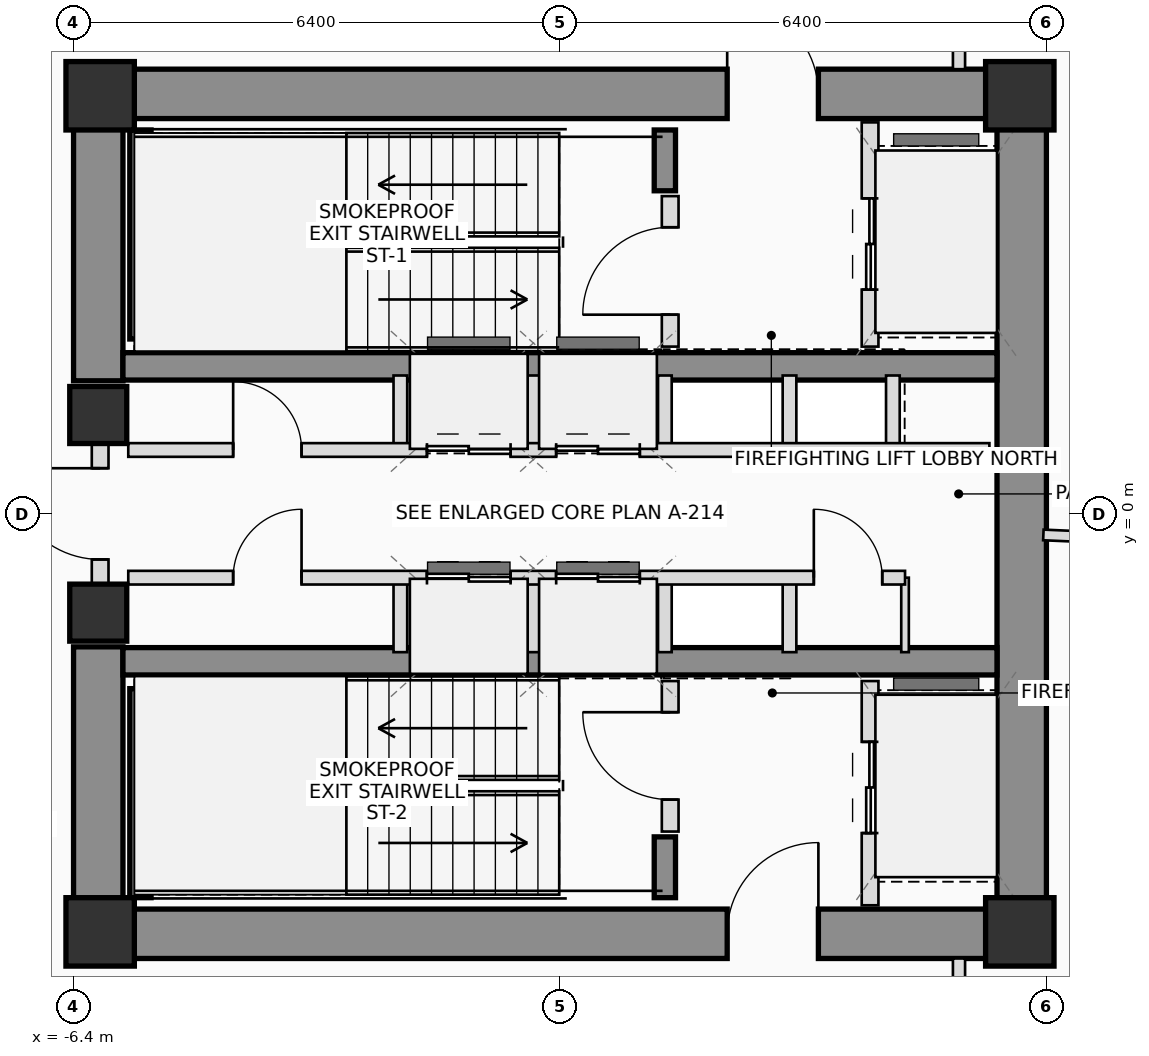
"""IFC4 building model, lengths in metres.
Left out: names, types, materials, properties, quantities, classifications, styles, units other than length and angle.
Written with IfcOpenShell. Run it as: python <this file> out.ifc"""

import sys

from ifc_helpers import new_model, si_unit, direction, frame, frame_2d, origin, origin_2d, place, context, subcontext, project, spatial, rectangle, extrude, source, transform, mapped, element, fill, save


model = new_model("IFC4")
c1 = context("Model", 3, precision=1e-05, world=origin(), true_north=direction((0.0, 1.0)))
c2 = subcontext(c1, "Body", "Model", "MODEL_VIEW")
j1 = project(units=[si_unit("LENGTHUNIT", "METRE"), si_unit("PLANEANGLEUNIT", "RADIAN")], contexts=[c1])
p1 = place(None, origin())
s1 = spatial("IfcSite", under=j1, at=p1, CompositionType="ELEMENT")
p2 = place(p1, origin())
s2 = spatial("IfcBuilding", under=s1, at=p2, CompositionType="ELEMENT")
p3 = place(p2, frame((0.0, 0.0, 150.2)))
s3 = spatial("IfcBuildingStorey", under=s2, at=p3, CompositionType="ELEMENT", Elevation=150.2)
m1 = source(origin(), c2, "Body", "SweptSolid", [
    extrude(rectangle(XDim=0.9, YDim=0.9, at=origin_2d()), origin(), (0.0, 0.0, 1.0), 3.45),
])
for number, where, z_axis, x_axis in (
    (1, (-6.05, -5.5, 0.0), (0.0, 0.0, 1.0), (1.0, 0.0, 0.0)),
    (2, (6.05, -5.5, 0.0), (0.0, 0.0, 1.0), (1.0, 0.0, 0.0)),
    (3, (6.05, 5.5, 0.0), (0.0, 0.0, 1.0), (1.0, 0.0, 0.0)),
    (4, (-6.05, 5.5, 0.0), (0.0, 0.0, 1.0), (1.0, 0.0, 0.0)),
):
    element("IfcColumn", number, at=place(p3, frame(where, z_axis=z_axis, x_axis=x_axis)), inside=s3, PredefinedType="COLUMN", context=c2, shape_type="MappedRepresentation", body=[
        mapped(m1, transform((0.0, 0.0, 0.0), scale=1.0)),
    ])
p4 = place(p3, frame((-6.4, 5.525, 0.0), z_axis=(0.0, 0.0, 1.0), x_axis=(1.0, 0.0, 0.0)))
e5 = element("IfcWall", 5, at=p4, inside=s3, PredefinedType="SHEAR", context=c2, shape_type="SweptSolid", body=[
    extrude(rectangle(XDim=12.8, YDim=0.65, at=frame_2d((6.4, 0.0))), origin(), (0.0, 0.0, 1.0), 3.45),
])
p5 = place(p4, frame((8.6, 0.0, 0.0)))
e6 = element("IfcOpeningElement", 6, at=p5, cuts=e5, PredefinedType="OPENING", context=c2, shape_type="SweptSolid", body=[
    extrude(rectangle(XDim=1.2, YDim=2.2, at=frame_2d((0.6, 1.1))), frame((0.0, 0.335, 0.0), z_axis=(0.0, -1.0, 0.0), x_axis=(1.0, 0.0, 0.0)), (0.0, 0.0, 1.0), 0.67),
])
p6 = place(p3, frame((-6.4, -5.525, 0.0), z_axis=(0.0, 0.0, 1.0), x_axis=(1.0, 0.0, 0.0)))
e7 = element("IfcWall", 7, at=p6, inside=s3, PredefinedType="SHEAR", context=c2, shape_type="SweptSolid", body=[
    extrude(rectangle(XDim=12.8, YDim=0.65, at=frame_2d((6.4, 0.0))), origin(), (0.0, 0.0, 1.0), 3.45),
])
p7 = place(p6, frame((8.6, 0.0, 0.0)))
e8 = element("IfcOpeningElement", 8, at=p7, cuts=e7, PredefinedType="OPENING", context=c2, shape_type="SweptSolid", body=[
    extrude(rectangle(XDim=1.2, YDim=2.2, at=frame_2d((0.6, 1.1))), frame((0.0, 0.335, 0.0), z_axis=(0.0, -1.0, 0.0), x_axis=(1.0, 0.0, 0.0)), (0.0, 0.0, 1.0), 0.67),
])
p8 = place(p3, frame((6.075, -5.2, 0.0), z_axis=(0.0, 0.0, 1.0), x_axis=(0.0, 1.0, 0.0)))
e9 = element("IfcWall", 9, at=p8, inside=s3, PredefinedType="SHEAR", context=c2, shape_type="SweptSolid", body=[
    extrude(rectangle(XDim=10.4, YDim=0.65, at=frame_2d((5.2, 0.0))), origin(), (0.0, 0.0, 1.0), 3.45),
])
for number, where, z_axis, x_axis in (
    (10, (-6.075, -5.2, 0.0), (0.0, 0.0, 1.0), (0.0, 1.0, 0.0)),
    (11, (-6.075, 1.75, 0.0), (0.0, 0.0, 1.0), (0.0, 1.0, 0.0)),
):
    element("IfcWall", number, at=place(p3, frame(where, z_axis=z_axis, x_axis=x_axis)), inside=s3, PredefinedType="SHEAR", context=c2, shape_type="SweptSolid", body=[
        extrude(rectangle(XDim=3.45, YDim=0.65, at=frame_2d((1.725, 0.0))), origin(), (0.0, 0.0, 1.0), 3.45),
    ])
for number, where, z_axis, x_axis in (
    (12, (-5.75, 1.94, 0.0), (0.0, 0.0, 1.0), (1.0, 0.0, 0.0)),
    (13, (-5.75, -1.94, 0.0), (0.0, 0.0, 1.0), (1.0, 0.0, 0.0)),
):
    element("IfcWall", number, at=place(p3, frame(where, z_axis=z_axis, x_axis=x_axis)), inside=s3, PredefinedType="SHEAR", context=c2, shape_type="SweptSolid", body=[
        extrude(rectangle(XDim=11.5, YDim=0.36, at=frame_2d((5.75, 0.0))), origin(), (0.0, 0.0, 1.0), 3.45),
    ])
p9 = place(p3, frame((-5.52, 2.3, 0.0), z_axis=(0.0, 0.0, 1.0), x_axis=(0.0, 1.0, 0.0)))
e14 = element("IfcWall", 14, at=p9, inside=s3, PredefinedType="SHEAR", context=c2, shape_type="SweptSolid", body=[
    extrude(rectangle(XDim=2.75, YDim=0.28, at=frame_2d((1.375, 0.0))), origin(), (0.0, 0.0, 1.0), 3.45),
])
p10 = place(p3, frame((1.38, 4.25, 0.0), z_axis=(0.0, 0.0, 1.0), x_axis=(0.0, 1.0, 0.0)))
e15 = element("IfcWall", 15, at=p10, inside=s3, PredefinedType="SHEAR", context=c2, shape_type="SweptSolid", body=[
    extrude(rectangle(XDim=0.8, YDim=0.28, at=frame_2d((0.4, 0.0))), origin(), (0.0, 0.0, 1.0), 3.45),
])
p11 = place(p3, frame((-5.52, -5.05, 0.0), z_axis=(0.0, 0.0, 1.0), x_axis=(0.0, 1.0, 0.0)))
e16 = element("IfcWall", 16, at=p11, inside=s3, PredefinedType="SHEAR", context=c2, shape_type="SweptSolid", body=[
    extrude(rectangle(XDim=2.75, YDim=0.28, at=frame_2d((1.375, 0.0))), origin(), (0.0, 0.0, 1.0), 3.45),
])
p12 = place(p3, frame((1.38, -5.05, 0.0), z_axis=(0.0, 0.0, 1.0), x_axis=(0.0, 1.0, 0.0)))
e17 = element("IfcWall", 17, at=p12, inside=s3, PredefinedType="SHEAR", context=c2, shape_type="SweptSolid", body=[
    extrude(rectangle(XDim=0.8, YDim=0.28, at=frame_2d((0.4, 0.0))), origin(), (0.0, 0.0, 1.0), 3.45),
])
m2 = source(origin(), c2, "Body", "SweptSolid", [
    extrude(rectangle(XDim=0.75, YDim=0.75, at=origin_2d()), origin(), (0.0, 0.0, 1.0), 3.45),
])
for number, where, z_axis, x_axis in (
    (18, (-6.075, -1.3, 0.0), (0.0, 0.0, 1.0), (1.0, 0.0, 0.0)),
    (19, (-6.075, 1.3, 0.0), (0.0, 0.0, 1.0), (1.0, 0.0, 0.0)),
):
    element("IfcColumn", number, at=place(p3, frame(where, z_axis=z_axis, x_axis=x_axis)), inside=s3, PredefinedType="COLUMN", context=c2, shape_type="MappedRepresentation", body=[
        mapped(m2, transform((0.0, 0.0, 0.0), scale=1.0)),
    ])
p13 = place(p3, frame((-6.05, -0.95, 0.0), z_axis=(0.0, 0.0, 1.0), x_axis=(0.0, 1.0, 0.0)))
e20 = element("IfcWall", 20, at=p13, inside=s3, PredefinedType="PLUMBINGWALL", context=c2, shape_type="SweptSolid", body=[
    extrude(rectangle(XDim=1.9, YDim=0.22, at=frame_2d((0.95, 0.0))), origin(), (0.0, 0.0, 1.0), 2.19),
])
p14 = place(p13, frame((0.35, 0.0, 0.0)))
e21 = element("IfcOpeningElement", 21, at=p14, cuts=e20, PredefinedType="OPENING", context=c2, shape_type="SweptSolid", body=[
    extrude(rectangle(XDim=1.2, YDim=2.2, at=frame_2d((0.6, 1.1))), frame((0.0, 0.12, 0.0), z_axis=(0.0, -1.0, 0.0), x_axis=(1.0, 0.0, 0.0)), (0.0, 0.0, 1.0), 0.24),
])
p15 = place(p3, frame((1.45, 2.2, 0.0), z_axis=(0.0, 0.0, 1.0), x_axis=(0.0, 1.0, 0.0)))
e22 = element("IfcWall", 22, at=p15, inside=s3, PredefinedType="PLUMBINGWALL", context=c2, shape_type="SweptSolid", body=[
    extrude(rectangle(XDim=1.98, YDim=0.22, at=frame_2d((0.99, 0.0))), origin(), (0.0, 0.0, 1.0), 3.21),
])
p16 = place(p15, frame((0.42, 0.0, 0.0)))
e23 = element("IfcOpeningElement", 23, at=p16, cuts=e22, PredefinedType="OPENING", context=c2, shape_type="SweptSolid", body=[
    extrude(rectangle(XDim=1.15, YDim=2.15, at=frame_2d((0.575, 1.075))), frame((0.0, 0.12, 0.0), z_axis=(0.0, -1.0, 0.0), x_axis=(1.0, 0.0, 0.0)), (0.0, 0.0, 1.0), 0.24),
])
p17 = place(p3, frame((4.08, 2.2, 0.0), z_axis=(0.0, 0.0, 1.0), x_axis=(0.0, 1.0, 0.0)))
e24 = element("IfcWall", 24, at=p17, inside=s3, PredefinedType="PLUMBINGWALL", context=c2, shape_type="SweptSolid", body=[
    extrude(rectangle(XDim=2.95, YDim=0.22, at=frame_2d((1.475, 0.0))), origin(), (0.0, 0.0, 1.0), 3.21),
])
p18 = place(p17, frame((0.75, 0.0, 0.0)))
e25 = element("IfcOpeningElement", 25, at=p18, cuts=e24, PredefinedType="OPENING", context=c2, shape_type="SweptSolid", body=[
    extrude(rectangle(XDim=1.2, YDim=2.25, at=frame_2d((0.6, 1.125))), frame((0.0, 0.12, 0.0), z_axis=(0.0, -1.0, 0.0), x_axis=(1.0, 0.0, 0.0)), (0.0, 0.0, 1.0), 0.24),
])
p19 = place(p3, frame((1.45, -4.18, 0.0), z_axis=(0.0, 0.0, 1.0), x_axis=(0.0, 1.0, 0.0)))
e26 = element("IfcWall", 26, at=p19, inside=s3, PredefinedType="PLUMBINGWALL", context=c2, shape_type="SweptSolid", body=[
    extrude(rectangle(XDim=1.98, YDim=0.22, at=frame_2d((0.99, 0.0))), origin(), (0.0, 0.0, 1.0), 3.21),
])
p20 = place(p19, frame((0.42, 0.0, 0.0)))
e27 = element("IfcOpeningElement", 27, at=p20, cuts=e26, PredefinedType="OPENING", context=c2, shape_type="SweptSolid", body=[
    extrude(rectangle(XDim=1.15, YDim=2.15, at=frame_2d((0.575, 1.075))), frame((0.0, 0.12, 0.0), z_axis=(0.0, -1.0, 0.0), x_axis=(1.0, 0.0, 0.0)), (0.0, 0.0, 1.0), 0.24),
])
p21 = place(p3, frame((4.08, -5.15, 0.0), z_axis=(0.0, 0.0, 1.0), x_axis=(0.0, 1.0, 0.0)))
e28 = element("IfcWall", 28, at=p21, inside=s3, PredefinedType="PLUMBINGWALL", context=c2, shape_type="SweptSolid", body=[
    extrude(rectangle(XDim=2.95, YDim=0.22, at=frame_2d((1.475, 0.0))), origin(), (0.0, 0.0, 1.0), 3.21),
])
p22 = place(p21, frame((0.95, 0.0, 0.0)))
e29 = element("IfcOpeningElement", 29, at=p22, cuts=e28, PredefinedType="OPENING", context=c2, shape_type="SweptSolid", body=[
    extrude(rectangle(XDim=1.2, YDim=2.25, at=frame_2d((0.6, 1.125))), frame((0.0, 0.12, 0.0), z_axis=(0.0, -1.0, 0.0), x_axis=(1.0, 0.0, 0.0)), (0.0, 0.0, 1.0), 0.24),
])
for number, where, z_axis, x_axis in (
    (30, (-2.1, 0.84, 0.0), (0.0, 0.0, 1.0), (0.0, 1.0, 0.0)),
    (31, (-2.1, -1.82, 0.0), (0.0, 0.0, 1.0), (0.0, 1.0, 0.0)),
    (32, (-0.35, 0.84, 0.0), (0.0, 0.0, 1.0), (0.0, 1.0, 0.0)),
    (33, (-0.35, -1.82, 0.0), (0.0, 0.0, 1.0), (0.0, 1.0, 0.0)),
    (34, (1.38, 0.84, 0.0), (0.0, 0.0, 1.0), (0.0, 1.0, 0.0)),
    (35, (1.38, -1.82, 0.0), (0.0, 0.0, 1.0), (0.0, 1.0, 0.0)),
    (36, (3.02, 0.84, 0.0), (0.0, 0.0, 1.0), (0.0, 1.0, 0.0)),
    (37, (4.38, 0.84, 0.0), (0.0, 0.0, 1.0), (0.0, 1.0, 0.0)),
    (38, (3.02, -1.82, 0.0), (0.0, 0.0, 1.0), (0.0, 1.0, 0.0)),
):
    element("IfcWall", number, at=place(p3, frame(where, z_axis=z_axis, x_axis=x_axis)), inside=s3, PredefinedType="PLUMBINGWALL", context=c2, shape_type="SweptSolid", body=[
        extrude(rectangle(XDim=0.98, YDim=0.18, at=frame_2d((0.49, 0.0))), origin(), (0.0, 0.0, 1.0), 3.21),
    ])
p23 = place(p3, frame((4.54, -1.82, 0.0), z_axis=(0.0, 0.0, 1.0), x_axis=(0.0, 1.0, 0.0)))
e39 = element("IfcWall", 39, at=p23, inside=s3, PredefinedType="PARTITIONING", context=c2, shape_type="SweptSolid", body=[
    extrude(rectangle(XDim=0.98, YDim=0.1, at=frame_2d((0.49, 0.0))), origin(), (0.0, 0.0, 1.0), 3.21),
])
p24 = place(p3, frame((-5.68, 0.84, 0.0), z_axis=(0.0, 0.0, 1.0), x_axis=(1.0, 0.0, 0.0)))
e40 = element("IfcWall", 40, at=p24, inside=s3, PredefinedType="PLUMBINGWALL", context=c2, shape_type="SweptSolid", body=[
    extrude(rectangle(XDim=11.33, YDim=0.18, at=frame_2d((5.665, 0.0))), origin(), (0.0, 0.0, 1.0), 3.21),
])
p25 = place(p24, frame((1.38, 0.0, 0.0)))
e41 = element("IfcOpeningElement", 41, at=p25, cuts=e40, PredefinedType="OPENING", context=c2, shape_type="SweptSolid", body=[
    extrude(rectangle(XDim=0.9, YDim=2.05, at=frame_2d((0.45, 1.025))), frame((0.0, 0.1, 0.0), z_axis=(0.0, -1.0, 0.0), x_axis=(1.0, 0.0, 0.0)), (0.0, 0.0, 1.0), 0.2),
])
p26 = place(p24, frame((3.93, 0.0, 0.0)))
e42 = element("IfcOpeningElement", 42, at=p26, cuts=e40, PredefinedType="OPENING", context=c2, shape_type="SweptSolid", body=[
    extrude(rectangle(XDim=1.1, YDim=2.2, at=frame_2d((0.55, 1.1))), frame((0.0, 0.1, 0.0), z_axis=(0.0, -1.0, 0.0), x_axis=(1.0, 0.0, 0.0)), (0.0, 0.0, 1.0), 0.2),
])
p27 = place(p24, frame((5.63, 0.0, 0.0)))
e43 = element("IfcOpeningElement", 43, at=p27, cuts=e40, PredefinedType="OPENING", context=c2, shape_type="SweptSolid", body=[
    extrude(rectangle(XDim=1.1, YDim=2.2, at=frame_2d((0.55, 1.1))), frame((0.0, 0.1, 0.0), z_axis=(0.0, -1.0, 0.0), x_axis=(1.0, 0.0, 0.0)), (0.0, 0.0, 1.0), 0.2),
])
p28 = place(p3, frame((-5.68, -0.84, 0.0), z_axis=(0.0, 0.0, 1.0), x_axis=(1.0, 0.0, 0.0)))
e44 = element("IfcWall", 44, at=p28, inside=s3, PredefinedType="PLUMBINGWALL", context=c2, shape_type="SweptSolid", body=[
    extrude(rectangle(XDim=10.22, YDim=0.18, at=frame_2d((5.11, 0.0))), origin(), (0.0, 0.0, 1.0), 3.21),
])
p29 = place(p28, frame((1.38, 0.0, 0.0)))
e45 = element("IfcOpeningElement", 45, at=p29, cuts=e44, PredefinedType="OPENING", context=c2, shape_type="SweptSolid", body=[
    extrude(rectangle(XDim=0.9, YDim=2.05, at=frame_2d((0.45, 1.025))), frame((0.0, 0.1, 0.0), z_axis=(0.0, -1.0, 0.0), x_axis=(1.0, 0.0, 0.0)), (0.0, 0.0, 1.0), 0.2),
])
p30 = place(p28, frame((3.93, 0.0, 0.0)))
e46 = element("IfcOpeningElement", 46, at=p30, cuts=e44, PredefinedType="OPENING", context=c2, shape_type="SweptSolid", body=[
    extrude(rectangle(XDim=1.1, YDim=2.2, at=frame_2d((0.55, 1.1))), frame((0.0, 0.1, 0.0), z_axis=(0.0, -1.0, 0.0), x_axis=(1.0, 0.0, 0.0)), (0.0, 0.0, 1.0), 0.2),
])
p31 = place(p28, frame((5.63, 0.0, 0.0)))
e47 = element("IfcOpeningElement", 47, at=p31, cuts=e44, PredefinedType="OPENING", context=c2, shape_type="SweptSolid", body=[
    extrude(rectangle(XDim=1.1, YDim=2.2, at=frame_2d((0.55, 1.1))), frame((0.0, 0.1, 0.0), z_axis=(0.0, -1.0, 0.0), x_axis=(1.0, 0.0, 0.0)), (0.0, 0.0, 1.0), 0.2),
])
p32 = place(p28, frame((9.02, 0.0, 0.0)))
e48 = element("IfcOpeningElement", 48, at=p32, cuts=e44, PredefinedType="OPENING", context=c2, shape_type="SweptSolid", body=[
    extrude(rectangle(XDim=0.9, YDim=2.05, at=frame_2d((0.45, 1.025))), frame((0.0, 0.1, 0.0), z_axis=(0.0, -1.0, 0.0), x_axis=(1.0, 0.0, 0.0)), (0.0, 0.0, 1.0), 0.2),
])
p33 = place(p3, frame((5.25, 7.5, 0.0), z_axis=(0.0, 0.0, 1.0), x_axis=(0.0, -1.0, 0.0)))
e49 = element("IfcWall", 49, at=p33, inside=s3, PredefinedType="PARTITIONING", context=c2, shape_type="SweptSolid", body=[
    extrude(rectangle(XDim=1.65, YDim=0.16, at=frame_2d((0.825, 0.0))), origin(), (0.0, 0.0, 1.0), 2.565),
])
p34 = place(p3, frame((5.25, -5.85, 0.0), z_axis=(0.0, 0.0, 1.0), x_axis=(0.0, -1.0, 0.0)))
e50 = element("IfcWall", 50, at=p34, inside=s3, PredefinedType="PARTITIONING", context=c2, shape_type="SweptSolid", body=[
    extrude(rectangle(XDim=1.65, YDim=0.16, at=frame_2d((0.825, 0.0))), origin(), (0.0, 0.0, 1.0), 3.21),
])
p35 = place(p3, frame((6.36, -0.278, 0.0), z_axis=(0.0, 0.0, 1.0), x_axis=(0.999047707238, -0.043631166178, 0.0)))
e51 = element("IfcWall", 51, at=p35, inside=s3, PredefinedType="PARTITIONING", context=c2, shape_type="SweptSolid", body=[
    extrude(rectangle(XDim=8.522, YDim=0.14, at=frame_2d((4.261, 0.0))), origin(), (0.0, 0.0, 1.0), 2.565),
])
p36 = place(p5, origin())
e52 = element("IfcDoor", 52, at=p36, inside=s3, OperationType="SINGLE_SWING_LEFT", PredefinedType="DOOR", context=c2, shape_type="SweptSolid", body=[
    extrude(rectangle(XDim=1.2, YDim=2.2, at=frame_2d((0.6, 1.1))), frame((0.0, 0.025, 0.0), z_axis=(0.0, -1.0, 0.0), x_axis=(1.0, 0.0, 0.0)), (0.0, 0.0, 1.0), 0.05),
])
fill(e6, e52)
p37 = place(p7, origin())
e53 = element("IfcDoor", 53, at=p37, inside=s3, OperationType="SINGLE_SWING_RIGHT", PredefinedType="DOOR", context=c2, shape_type="SweptSolid", body=[
    extrude(rectangle(XDim=1.2, YDim=2.2, at=frame_2d((0.6, 1.1))), frame((0.0, 0.025, 0.0), z_axis=(0.0, -1.0, 0.0), x_axis=(1.0, 0.0, 0.0)), (0.0, 0.0, 1.0), 0.05),
])
fill(e8, e53)
p38 = place(p14, origin())
e54 = element("IfcDoor", 54, at=p38, inside=s3, OperationType="SINGLE_SWING_RIGHT", PredefinedType="DOOR", context=c2, shape_type="SweptSolid", body=[
    extrude(rectangle(XDim=1.2, YDim=2.2, at=frame_2d((0.6, 1.1))), frame((0.0, 0.025, 0.0), z_axis=(0.0, -1.0, 0.0), x_axis=(1.0, 0.0, 0.0)), (0.0, 0.0, 1.0), 0.05),
])
fill(e21, e54)
p39 = place(p16, origin())
e55 = element("IfcDoor", 55, at=p39, inside=s3, OperationType="SINGLE_SWING_LEFT", PredefinedType="DOOR", context=c2, shape_type="SweptSolid", body=[
    extrude(rectangle(XDim=1.15, YDim=2.15, at=frame_2d((0.575, 1.075))), frame((0.0, 0.025, 0.0), z_axis=(0.0, -1.0, 0.0), x_axis=(1.0, 0.0, 0.0)), (0.0, 0.0, 1.0), 0.05),
])
fill(e23, e55)
p40 = place(p18, origin())
e56 = element("IfcDoor", 56, at=p40, inside=s3, OperationType="DOUBLE_DOOR_SLIDING", PredefinedType="DOOR", context=c2, shape_type="SweptSolid", body=[
    extrude(rectangle(XDim=1.2, YDim=2.25, at=frame_2d((0.6, 1.125))), frame((0.0, 0.025, 0.0), z_axis=(0.0, -1.0, 0.0), x_axis=(1.0, 0.0, 0.0)), (0.0, 0.0, 1.0), 0.05),
])
fill(e25, e56)
p41 = place(p20, origin())
e57 = element("IfcDoor", 57, at=p41, inside=s3, OperationType="SINGLE_SWING_RIGHT", PredefinedType="DOOR", context=c2, shape_type="SweptSolid", body=[
    extrude(rectangle(XDim=1.15, YDim=2.15, at=frame_2d((0.575, 1.075))), frame((0.0, 0.025, 0.0), z_axis=(0.0, -1.0, 0.0), x_axis=(1.0, 0.0, 0.0)), (0.0, 0.0, 1.0), 0.05),
])
fill(e27, e57)
p42 = place(p22, origin())
e58 = element("IfcDoor", 58, at=p42, inside=s3, OperationType="DOUBLE_DOOR_SLIDING", PredefinedType="DOOR", context=c2, shape_type="SweptSolid", body=[
    extrude(rectangle(XDim=1.2, YDim=2.25, at=frame_2d((0.6, 1.125))), frame((0.0, 0.025, 0.0), z_axis=(0.0, -1.0, 0.0), x_axis=(1.0, 0.0, 0.0)), (0.0, 0.0, 1.0), 0.05),
])
fill(e29, e58)
p43 = place(p25, origin())
e59 = element("IfcDoor", 59, at=p43, inside=s3, OperationType="SINGLE_SWING_LEFT", PredefinedType="DOOR", context=c2, shape_type="SweptSolid", body=[
    extrude(rectangle(XDim=0.9, YDim=2.05, at=frame_2d((0.45, 1.025))), frame((0.0, 0.025, 0.0), z_axis=(0.0, -1.0, 0.0), x_axis=(1.0, 0.0, 0.0)), (0.0, 0.0, 1.0), 0.05),
])
fill(e41, e59)
p44 = place(p26, origin())
e60 = element("IfcDoor", 60, at=p44, inside=s3, OperationType="DOUBLE_DOOR_SLIDING", PredefinedType="DOOR", context=c2, shape_type="SweptSolid", body=[
    extrude(rectangle(XDim=1.1, YDim=2.2, at=frame_2d((0.55, 1.1))), frame((0.0, 0.025, 0.0), z_axis=(0.0, -1.0, 0.0), x_axis=(1.0, 0.0, 0.0)), (0.0, 0.0, 1.0), 0.05),
])
fill(e42, e60)
p45 = place(p27, origin())
e61 = element("IfcDoor", 61, at=p45, inside=s3, OperationType="DOUBLE_DOOR_SLIDING", PredefinedType="DOOR", context=c2, shape_type="SweptSolid", body=[
    extrude(rectangle(XDim=1.1, YDim=2.2, at=frame_2d((0.55, 1.1))), frame((0.0, 0.025, 0.0), z_axis=(0.0, -1.0, 0.0), x_axis=(1.0, 0.0, 0.0)), (0.0, 0.0, 1.0), 0.05),
])
fill(e43, e61)
p46 = place(p29, origin())
e62 = element("IfcDoor", 62, at=p46, inside=s3, OperationType="SINGLE_SWING_RIGHT", PredefinedType="DOOR", context=c2, shape_type="SweptSolid", body=[
    extrude(rectangle(XDim=0.9, YDim=2.05, at=frame_2d((0.45, 1.025))), frame((0.0, 0.025, 0.0), z_axis=(0.0, -1.0, 0.0), x_axis=(1.0, 0.0, 0.0)), (0.0, 0.0, 1.0), 0.05),
])
fill(e45, e62)
p47 = place(p30, origin())
e63 = element("IfcDoor", 63, at=p47, inside=s3, OperationType="DOUBLE_DOOR_SLIDING", PredefinedType="DOOR", context=c2, shape_type="SweptSolid", body=[
    extrude(rectangle(XDim=1.1, YDim=2.2, at=frame_2d((0.55, 1.1))), frame((0.0, 0.025, 0.0), z_axis=(0.0, -1.0, 0.0), x_axis=(1.0, 0.0, 0.0)), (0.0, 0.0, 1.0), 0.05),
])
fill(e46, e63)
p48 = place(p31, origin())
e64 = element("IfcDoor", 64, at=p48, inside=s3, OperationType="DOUBLE_DOOR_SLIDING", PredefinedType="DOOR", context=c2, shape_type="SweptSolid", body=[
    extrude(rectangle(XDim=1.1, YDim=2.2, at=frame_2d((0.55, 1.1))), frame((0.0, 0.025, 0.0), z_axis=(0.0, -1.0, 0.0), x_axis=(1.0, 0.0, 0.0)), (0.0, 0.0, 1.0), 0.05),
])
fill(e47, e64)
p49 = place(p32, origin())
e65 = element("IfcDoor", 65, at=p49, inside=s3, OperationType="SINGLE_SWING_LEFT", PredefinedType="DOOR", context=c2, shape_type="SweptSolid", body=[
    extrude(rectangle(XDim=0.9, YDim=2.05, at=frame_2d((0.45, 1.025))), frame((0.0, 0.025, 0.0), z_axis=(0.0, -1.0, 0.0), x_axis=(1.0, 0.0, 0.0)), (0.0, 0.0, 1.0), 0.05),
])
fill(e48, e65)
save(model, sys.argv[1])
